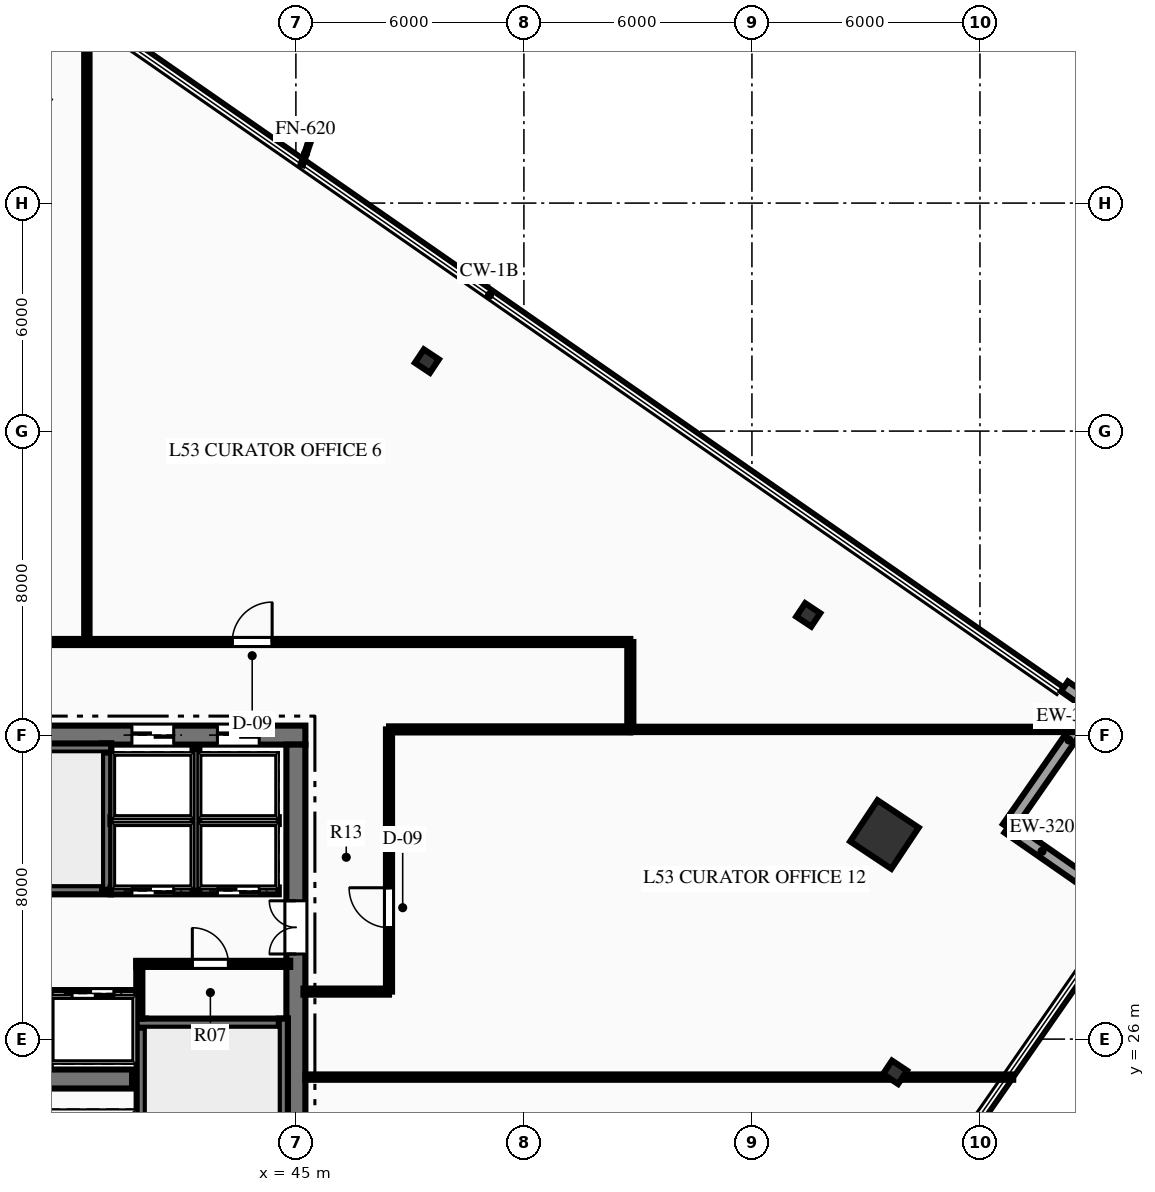
"""IFC4 building model, lengths in metres.
Left out: names, types, materials, properties, quantities, classifications, styles, units other than length and angle.
Written with IfcOpenShell. Run it as: python <this file> out.ifc"""

import sys

from ifc_helpers import new_model, si_unit, direction, frame, frame_2d, origin, origin_2d, place, context, subcontext, project, spatial, rectangle, hollow_rectangle, i_section, extrude, element, fill, save


model = new_model("IFC4")
c1 = context("Model", 3, precision=1e-05, world=origin(), true_north=direction((0.0, 1.0)))
c2 = subcontext(c1, "Body", "Model", "MODEL_VIEW")
j1 = project(units=[si_unit("LENGTHUNIT", "METRE"), si_unit("PLANEANGLEUNIT", "RADIAN")], contexts=[c1])
p1 = place(None, origin())
s1 = spatial("IfcSite", under=j1, at=p1, CompositionType="ELEMENT")
p2 = place(p1, origin())
s2 = spatial("IfcBuilding", under=s1, at=p2, CompositionType="ELEMENT")
p3 = place(p2, frame((0.0, 0.0, 213.45)))
s3 = spatial("IfcBuildingStorey", under=s2, at=p3, CompositionType="ELEMENT", Elevation=213.45)
p4 = place(p3, frame((26.75, 34.0, 0.0), z_axis=(0.0, 0.0, 1.0), x_axis=(1.0, 0.0, 0.0)))
e1 = element("IfcWall", 1, at=p4, inside=s3, PredefinedType="SHEAR", context=c2, shape_type="SweptSolid", body=[
    extrude(rectangle(XDim=18.5, YDim=0.5, at=frame_2d((9.25, 0.0))), origin(), (0.0, 0.0, 1.0), 3.75),
])
p5 = place(p4, frame((13.935, 0.0, 0.0)))
e2 = element("IfcOpeningElement", 2, at=p5, cuts=e1, PredefinedType="OPENING", context=c2, shape_type="SweptSolid", body=[
    extrude(rectangle(XDim=1.1, YDim=2.15, at=frame_2d((0.55, 1.075))), frame((0.0, 0.26, 0.0), z_axis=(0.0, -1.0, 0.0), x_axis=(1.0, 0.0, 0.0)), (0.0, 0.0, 1.0), 0.52),
])
p6 = place(p4, frame((16.185, 0.0, 0.0)))
e3 = element("IfcOpeningElement", 3, at=p6, cuts=e1, PredefinedType="OPENING", context=c2, shape_type="SweptSolid", body=[
    extrude(rectangle(XDim=1.1, YDim=2.15, at=frame_2d((0.55, 1.075))), frame((0.0, 0.26, 0.0), z_axis=(0.0, -1.0, 0.0), x_axis=(1.0, 0.0, 0.0)), (0.0, 0.0, 1.0), 0.52),
])
p7 = place(p3, frame((45.0, 18.25, 0.0), z_axis=(0.0, 0.0, 1.0), x_axis=(0.0, 1.0, 0.0)))
e4 = element("IfcWall", 4, at=p7, inside=s3, PredefinedType="SHEAR", context=c2, shape_type="SweptSolid", body=[
    extrude(rectangle(XDim=15.5, YDim=0.5, at=frame_2d((7.75, 0.0))), origin(), (0.0, 0.0, 1.0), 3.75),
])
p8 = place(p7, frame((9.99, 0.0, 0.0)))
e5 = element("IfcOpeningElement", 5, at=p8, cuts=e4, PredefinedType="OPENING", context=c2, shape_type="SweptSolid", body=[
    extrude(rectangle(XDim=1.4, YDim=2.2, at=frame_2d((0.7, 1.1))), frame((0.0, 0.26, 0.0), z_axis=(0.0, -1.0, 0.0), x_axis=(1.0, 0.0, 0.0)), (0.0, 0.0, 1.0), 0.52),
])
p9 = place(p3, frame((31.31, 24.95, 0.0), z_axis=(0.0, 0.0, 1.0), x_axis=(1.0, 0.0, 0.0)))
e6 = element("IfcWall", 6, at=p9, inside=s3, PredefinedType="SHEAR", context=c2, shape_type="SweptSolid", body=[
    extrude(rectangle(XDim=9.38, YDim=0.5, at=frame_2d((4.69, 0.0))), origin(), (0.0, 0.0, 1.0), 3.75),
])
p10 = place(p3, frame((40.93, 18.28, 0.0), z_axis=(0.0, 0.0, 1.0), x_axis=(0.0, 1.0, 0.0)))
e7 = element("IfcWall", 7, at=p10, inside=s3, PredefinedType="SHEAR", context=c2, shape_type="SweptSolid", body=[
    extrude(rectangle(XDim=8.26, YDim=0.24, at=frame_2d((4.13, 0.0))), origin(), (0.0, 0.0, 1.0), 3.75),
])
p11 = place(p10, frame((0.365, 0.0, 0.0)))
e8 = element("IfcOpeningElement", 8, at=p11, cuts=e7, PredefinedType="OPENING", context=c2, shape_type="SweptSolid", body=[
    extrude(rectangle(XDim=1.05, YDim=2.15, at=frame_2d((0.525, 1.075))), frame((0.0, 0.13, 0.0), z_axis=(0.0, -1.0, 0.0), x_axis=(1.0, 0.0, 0.0)), (0.0, 0.0, 1.0), 0.26),
])
p12 = place(p3, frame((40.81, 26.42, 0.0), z_axis=(0.0, 0.0, 1.0), x_axis=(1.0, 0.0, 0.0)))
e9 = element("IfcWall", 9, at=p12, inside=s3, PredefinedType="SHEAR", context=c2, shape_type="SweptSolid", body=[
    extrude(rectangle(XDim=3.98, YDim=0.24, at=frame_2d((1.99, 0.0))), origin(), (0.0, 0.0, 1.0), 3.75),
])
p13 = place(p3, frame((44.67, 18.28, 0.0), z_axis=(0.0, 0.0, 1.0), x_axis=(0.0, 1.0, 0.0)))
e10 = element("IfcWall", 10, at=p13, inside=s3, PredefinedType="SHEAR", context=c2, shape_type="SweptSolid", body=[
    extrude(rectangle(XDim=8.26, YDim=0.24, at=frame_2d((4.13, 0.0))), origin(), (0.0, 0.0, 1.0), 3.75),
])
p14 = place(p3, frame((31.76, 29.93, 0.0), z_axis=(0.0, 0.0, 1.0), x_axis=(1.0, 0.0, 0.0)))
e11 = element("IfcWall", 11, at=p14, inside=s3, PredefinedType="SHEAR", context=c2, shape_type="SweptSolid", body=[
    extrude(rectangle(XDim=8.38, YDim=0.24, at=frame_2d((4.19, 0.0))), origin(), (0.0, 0.0, 1.0), 3.75),
])
p15 = place(p14, frame((0.565, 0.0, 0.0)))
e12 = element("IfcOpeningElement", 12, at=p15, cuts=e11, PredefinedType="OPENING", context=c2, shape_type="SweptSolid", body=[
    extrude(rectangle(XDim=1.05, YDim=2.15, at=frame_2d((0.525, 1.075))), frame((0.0, 0.13, 0.0), z_axis=(0.0, -1.0, 0.0), x_axis=(1.0, 0.0, 0.0)), (0.0, 0.0, 1.0), 0.26),
])
p16 = place(p3, frame((40.02, 29.93, 0.0), z_axis=(0.0, 0.0, 1.0), x_axis=(0.0, 1.0, 0.0)))
e13 = element("IfcWall", 13, at=p16, inside=s3, PredefinedType="SHEAR", context=c2, shape_type="SweptSolid", body=[
    extrude(rectangle(XDim=3.85, YDim=0.24, at=frame_2d((1.925, 0.0))), origin(), (0.0, 0.0, 1.0), 3.75),
])
p17 = place(p3, frame((37.85, 33.66, 0.0), z_axis=(0.0, 0.0, 1.0), x_axis=(1.0, 0.0, 0.0)))
e14 = element("IfcWall", 14, at=p17, inside=s3, PredefinedType="SHEAR", context=c2, shape_type="SweptSolid", body=[
    extrude(rectangle(XDim=2.29, YDim=0.24, at=frame_2d((1.145, 0.0))), origin(), (0.0, 0.0, 1.0), 3.75),
])
p18 = place(p3, frame((60.486, 31.384, 0.0), z_axis=(0.0, 0.0, 1.0), x_axis=(0.554118199338, 0.832437998389, 0.0)))
e15 = element("IfcColumn", 15, at=p18, inside=s3, PredefinedType="COLUMN", context=c2, shape_type="SweptSolid", body=[
    extrude(hollow_rectangle(XDim=1.3, YDim=1.3, WallThickness=0.06, at=origin_2d()), origin(), (0.0, 0.0, 1.0), 3.75),
])
for number, where, z_axis, x_axis in (
    (16, (60.766, 25.126, 0.0), (0.0, 0.0, 1.0), (0.554, 0.832, 0.0)),
    (17, (58.481, 37.164, 0.0), (0.0, 0.0, 1.0), (0.554, 0.832, 0.0)),
    (18, (48.448, 43.842, 0.0), (0.0, 0.0, 1.0), (0.554, 0.832, 0.0)),
):
    element("IfcColumn", number, at=place(p3, frame(where, z_axis=z_axis, x_axis=x_axis)), inside=s3, PredefinedType="COLUMN", context=c2, shape_type="SweptSolid", body=[
        extrude(i_section(OverallWidth=0.424, OverallDepth=0.474, WebThickness=0.048, FlangeThickness=0.077, at=origin_2d()), origin(), (0.0, 0.0, 1.0), 3.75),
    ])
p19 = place(p3, frame((63.737, 31.565, 0.0), z_axis=(0.0, 0.0, 1.0), x_axis=(0.821156469931, -0.570703120625, 0.0)))
e19 = element("IfcWall", 19, at=p19, inside=s3, PredefinedType="STANDARD", context=c2, shape_type="SweptSolid", body=[
    extrude(rectangle(XDim=3.9, YDim=0.32, at=frame_2d((1.95, 0.0))), origin(), (0.0, 0.0, 1.0), 3.47),
])
p20 = place(p3, frame((65.963, 34.768, 0.0), z_axis=(0.0, 0.0, 1.0), x_axis=(-0.570732457334, -0.821136080163, 0.0)))
e20 = element("IfcWall", 20, at=p20, inside=s3, PredefinedType="STANDARD", context=c2, shape_type="SweptSolid", body=[
    extrude(rectangle(XDim=3.9, YDim=0.32, at=frame_2d((1.95, 0.0))), origin(), (0.0, 0.0, 1.0), 3.47),
])
p21 = place(p3, frame((65.224, 35.281, 0.0), z_axis=(0.0, 0.0, 1.0), x_axis=(0.821126300875, -0.570746526938, 0.0)))
e21 = element("IfcWall", 21, at=p21, inside=s3, PredefinedType="STANDARD", context=c2, shape_type="SweptSolid", body=[
    extrude(rectangle(XDim=0.9, YDim=0.32, at=frame_2d((0.45, 0.0))), origin(), (0.0, 0.0, 1.0), 3.47),
])
p22 = place(p3, frame((40.8, 27.98, 0.0), z_axis=(0.0, 0.0, 1.0), x_axis=(1.0, 0.0, 0.0)))
e22 = element("IfcWall", 22, at=p22, inside=s3, PredefinedType="PARTITIONING", context=c2, shape_type="SweptSolid", body=[
    extrude(rectangle(XDim=4.05, YDim=0.16, at=frame_2d((2.025, 0.0))), origin(), (0.0, 0.0, 1.0), 3.47),
])
p23 = place(p22, frame((1.475, 0.0, 0.0)))
e23 = element("IfcOpeningElement", 23, at=p23, cuts=e22, PredefinedType="OPENING", context=c2, shape_type="SweptSolid", body=[
    extrude(rectangle(XDim=0.95, YDim=2.15, at=frame_2d((0.475, 1.075))), frame((0.0, 0.09, 0.0), z_axis=(0.0, -1.0, 0.0), x_axis=(1.0, 0.0, 0.0)), (0.0, 0.0, 1.0), 0.18),
])
p24 = place(p3, frame((40.88, 26.54, 0.0), z_axis=(0.0, 0.0, 1.0), x_axis=(0.0, 1.0, 0.0)))
e24 = element("IfcWall", 24, at=p24, inside=s3, PredefinedType="PARTITIONING", context=c2, shape_type="SweptSolid", body=[
    extrude(rectangle(XDim=1.51, YDim=0.16, at=frame_2d((0.755, 0.0))), origin(), (0.0, 0.0, 1.0), 3.47),
])
p25 = place(p3, frame((40.12, 29.9, 0.0), z_axis=(0.0, 0.0, 1.0), x_axis=(1.0, 0.0, 0.0)))
e25 = element("IfcWall", 25, at=p25, inside=s3, PredefinedType="PARTITIONING", context=c2, shape_type="SweptSolid", body=[
    extrude(rectangle(XDim=4.43, YDim=0.18, at=frame_2d((2.215, 0.0))), origin(), (0.0, 0.0, 1.0), 3.47),
])
p26 = place(p25, frame((0.565, 0.0, 0.0)))
e26 = element("IfcOpeningElement", 26, at=p26, cuts=e25, PredefinedType="OPENING", context=c2, shape_type="SweptSolid", body=[
    extrude(rectangle(XDim=1.1, YDim=2.15, at=frame_2d((0.55, 1.075))), frame((0.0, 0.1, 0.0), z_axis=(0.0, -1.0, 0.0), x_axis=(1.0, 0.0, 0.0)), (0.0, 0.0, 1.0), 0.2),
])
p27 = place(p25, frame((2.815, 0.0, 0.0)))
e27 = element("IfcOpeningElement", 27, at=p27, cuts=e25, PredefinedType="OPENING", context=c2, shape_type="SweptSolid", body=[
    extrude(rectangle(XDim=1.1, YDim=2.15, at=frame_2d((0.55, 1.075))), frame((0.0, 0.1, 0.0), z_axis=(0.0, -1.0, 0.0), x_axis=(1.0, 0.0, 0.0)), (0.0, 0.0, 1.0), 0.2),
])
p28 = place(p3, frame((40.12, 31.75, 0.0), z_axis=(0.0, 0.0, 1.0), x_axis=(1.0, 0.0, 0.0)))
e28 = element("IfcWall", 28, at=p28, inside=s3, PredefinedType="PARTITIONING", context=c2, shape_type="SweptSolid", body=[
    extrude(rectangle(XDim=4.43, YDim=0.18, at=frame_2d((2.215, 0.0))), origin(), (0.0, 0.0, 1.0), 3.47),
])
p29 = place(p3, frame((42.37, 29.9, 0.0), z_axis=(0.0, 0.0, 1.0), x_axis=(0.0, 1.0, 0.0)))
e29 = element("IfcWall", 29, at=p29, inside=s3, PredefinedType="PARTITIONING", context=c2, shape_type="SweptSolid", body=[
    extrude(rectangle(XDim=3.75, YDim=0.18, at=frame_2d((1.875, 0.0))), origin(), (0.0, 0.0, 1.0), 3.47),
])
p30 = place(p3, frame((31.2, 27.2, 0.0), z_axis=(0.0, 0.0, 1.0), x_axis=(1.0, 0.0, 0.0)))
e30 = element("IfcWall", 30, at=p30, inside=s3, PredefinedType="PARTITIONING", context=c2, shape_type="SweptSolid", body=[
    extrude(rectangle(XDim=9.6, YDim=0.18, at=frame_2d((4.8, 0.0))), origin(), (0.0, 0.0, 1.0), 3.47),
])
p31 = place(p30, frame((0.59, 0.0, 0.0)))
e31 = element("IfcOpeningElement", 31, at=p31, cuts=e30, PredefinedType="OPENING", context=c2, shape_type="SweptSolid", body=[
    extrude(rectangle(XDim=1.1, YDim=2.15, at=frame_2d((0.55, 1.075))), frame((0.0, 0.1, 0.0), z_axis=(0.0, -1.0, 0.0), x_axis=(1.0, 0.0, 0.0)), (0.0, 0.0, 1.0), 0.2),
])
p32 = place(p30, frame((2.99, 0.0, 0.0)))
e32 = element("IfcOpeningElement", 32, at=p32, cuts=e30, PredefinedType="OPENING", context=c2, shape_type="SweptSolid", body=[
    extrude(rectangle(XDim=1.1, YDim=2.15, at=frame_2d((0.55, 1.075))), frame((0.0, 0.1, 0.0), z_axis=(0.0, -1.0, 0.0), x_axis=(1.0, 0.0, 0.0)), (0.0, 0.0, 1.0), 0.2),
])
p33 = place(p30, frame((5.51, 0.0, 0.0)))
e33 = element("IfcOpeningElement", 33, at=p33, cuts=e30, PredefinedType="OPENING", context=c2, shape_type="SweptSolid", body=[
    extrude(rectangle(XDim=1.1, YDim=2.15, at=frame_2d((0.55, 1.075))), frame((0.0, 0.1, 0.0), z_axis=(0.0, -1.0, 0.0), x_axis=(1.0, 0.0, 0.0)), (0.0, 0.0, 1.0), 0.2),
])
p34 = place(p30, frame((7.91, 0.0, 0.0)))
e34 = element("IfcOpeningElement", 34, at=p34, cuts=e30, PredefinedType="OPENING", context=c2, shape_type="SweptSolid", body=[
    extrude(rectangle(XDim=1.1, YDim=2.15, at=frame_2d((0.55, 1.075))), frame((0.0, 0.1, 0.0), z_axis=(0.0, -1.0, 0.0), x_axis=(1.0, 0.0, 0.0)), (0.0, 0.0, 1.0), 0.2),
])
p35 = place(p3, frame((18.2, 36.45, 0.0), z_axis=(0.0, 0.0, 1.0), x_axis=(1.0, 0.0, 0.0)))
e35 = element("IfcWall", 35, at=p35, inside=s3, PredefinedType="PARTITIONING", context=c2, shape_type="SweptSolid", body=[
    extrude(rectangle(XDim=35.6, YDim=0.16, at=frame_2d((17.8, 0.0))), origin(), (0.0, 0.0, 1.0), 2.849),
])
p36 = place(p35, frame((7.55, 0.0, 0.0)))
e36 = element("IfcOpeningElement", 36, at=p36, cuts=e35, PredefinedType="OPENING", context=c2, shape_type="SweptSolid", body=[
    extrude(rectangle(XDim=0.9, YDim=2.15, at=frame_2d((0.45, 1.075))), frame((0.0, 0.09, 0.0), z_axis=(0.0, -1.0, 0.0), x_axis=(1.0, 0.0, 0.0)), (0.0, 0.0, 1.0), 0.18),
])
p37 = place(p35, frame((9.85, 0.0, 0.0)))
e37 = element("IfcOpeningElement", 37, at=p37, cuts=e35, PredefinedType="OPENING", context=c2, shape_type="SweptSolid", body=[
    extrude(rectangle(XDim=0.9, YDim=2.15, at=frame_2d((0.45, 1.075))), frame((0.0, 0.09, 0.0), z_axis=(0.0, -1.0, 0.0), x_axis=(1.0, 0.0, 0.0)), (0.0, 0.0, 1.0), 0.18),
])
p38 = place(p35, frame((12.1, 0.0, 0.0)))
e38 = element("IfcOpeningElement", 38, at=p38, cuts=e35, PredefinedType="OPENING", context=c2, shape_type="SweptSolid", body=[
    extrude(rectangle(XDim=1.0, YDim=2.15, at=frame_2d((0.5, 1.075))), frame((0.0, 0.09, 0.0), z_axis=(0.0, -1.0, 0.0), x_axis=(1.0, 0.0, 0.0)), (0.0, 0.0, 1.0), 0.18),
])
p39 = place(p35, frame((17.01, 0.0, 0.0)))
e39 = element("IfcOpeningElement", 39, at=p39, cuts=e35, PredefinedType="OPENING", context=c2, shape_type="SweptSolid", body=[
    extrude(rectangle(XDim=1.05, YDim=2.15, at=frame_2d((0.525, 1.075))), frame((0.0, 0.09, 0.0), z_axis=(0.0, -1.0, 0.0), x_axis=(1.0, 0.0, 0.0)), (0.0, 0.0, 1.0), 0.18),
])
p40 = place(p35, frame((25.125, 0.0, 0.0)))
e40 = element("IfcOpeningElement", 40, at=p40, cuts=e35, PredefinedType="OPENING", context=c2, shape_type="SweptSolid", body=[
    extrude(rectangle(XDim=1.05, YDim=2.15, at=frame_2d((0.525, 1.075))), frame((0.0, 0.09, 0.0), z_axis=(0.0, -1.0, 0.0), x_axis=(1.0, 0.0, 0.0)), (0.0, 0.0, 1.0), 0.18),
])
p41 = place(p3, frame((47.45, 34.15, 0.0), z_axis=(0.0, 0.0, 1.0), x_axis=(1.0, 0.0, 0.0)))
e41 = element("IfcWall", 41, at=p41, inside=s3, PredefinedType="PARTITIONING", context=c2, shape_type="SweptSolid", body=[
    extrude(rectangle(XDim=6.35, YDim=0.16, at=frame_2d((3.175, 0.0))), origin(), (0.0, 0.0, 1.0), 3.47),
])
p42 = place(p3, frame((47.45, 27.25, 0.0), z_axis=(0.0, 0.0, 1.0), x_axis=(0.0, 1.0, 0.0)))
e42 = element("IfcWall", 42, at=p42, inside=s3, PredefinedType="PARTITIONING", context=c2, shape_type="SweptSolid", body=[
    extrude(rectangle(XDim=6.9, YDim=0.16, at=frame_2d((3.45, 0.0))), origin(), (0.0, 0.0, 1.0), 3.47),
])
p43 = place(p42, frame((1.683, 0.0, 0.0)))
e43 = element("IfcOpeningElement", 43, at=p43, cuts=e42, PredefinedType="OPENING", context=c2, shape_type="SweptSolid", body=[
    extrude(rectangle(XDim=1.05, YDim=2.15, at=frame_2d((0.525, 1.075))), frame((0.0, 0.09, 0.0), z_axis=(0.0, -1.0, 0.0), x_axis=(1.0, 0.0, 0.0)), (0.0, 0.0, 1.0), 0.18),
])
p44 = place(p3, frame((45.2, 27.25, 0.0), z_axis=(0.0, 0.0, 1.0), x_axis=(1.0, 0.0, 0.0)))
e44 = element("IfcWall", 44, at=p44, inside=s3, PredefinedType="PARTITIONING", context=c2, shape_type="SweptSolid", body=[
    extrude(rectangle(XDim=2.25, YDim=0.16, at=frame_2d((1.125, 0.0))), origin(), (0.0, 0.0, 1.0), 3.47),
])
p45 = place(p3, frame((53.8, 34.15, 0.0), z_axis=(0.0, 0.0, 1.0), x_axis=(0.0, 1.0, 0.0)))
e45 = element("IfcWall", 45, at=p45, inside=s3, PredefinedType="PARTITIONING", context=c2, shape_type="SweptSolid", body=[
    extrude(rectangle(XDim=2.3, YDim=0.16, at=frame_2d((1.15, 0.0))), origin(), (0.0, 0.0, 1.0), 3.47),
])
p46 = place(p3, frame((53.8, 34.15, 0.0), z_axis=(0.0, 0.0, 1.0), x_axis=(1.0, 0.0, 0.0)))
e46 = element("IfcWall", 46, at=p46, inside=s3, PredefinedType="PARTITIONING", context=c2, shape_type="SweptSolid", body=[
    extrude(rectangle(XDim=11.685, YDim=0.14, at=frame_2d((5.842, 0.0))), origin(), (0.0, 0.0, 1.0), 3.47),
])
p47 = place(p3, frame((39.5, 36.45, 0.0), z_axis=(0.0, 0.0, 1.0), x_axis=(0.0, 1.0, 0.0)))
e47 = element("IfcWall", 47, at=p47, inside=s3, PredefinedType="PARTITIONING", context=c2, shape_type="SweptSolid", body=[
    extrude(rectangle(XDim=16.661, YDim=0.14, at=frame_2d((8.331, 0.0))), origin(), (0.0, 0.0, 1.0), 3.47),
])
p48 = place(p3, frame((45.25, 25.0, 0.0), z_axis=(0.0, 0.0, 1.0), x_axis=(1.0, 0.0, 0.0)))
e48 = element("IfcWall", 48, at=p48, inside=s3, PredefinedType="PARTITIONING", context=c2, shape_type="SweptSolid", body=[
    extrude(rectangle(XDim=18.625, YDim=0.14, at=frame_2d((9.312, 0.0))), origin(), (0.0, 0.0, 1.0), 2.849),
])
p49 = place(p23, origin())
e49 = element("IfcDoor", 49, at=p49, inside=s3, OperationType="SINGLE_SWING_LEFT", PredefinedType="DOOR", context=c2, shape_type="SweptSolid", body=[
    extrude(rectangle(XDim=0.95, YDim=2.15, at=frame_2d((0.475, 1.075))), frame((0.0, 0.025, 0.0), z_axis=(0.0, -1.0, 0.0), x_axis=(1.0, 0.0, 0.0)), (0.0, 0.0, 1.0), 0.05),
])
fill(e23, e49)
p50 = place(p8, origin())
e50 = element("IfcDoor", 50, at=p50, inside=s3, OperationType="DOUBLE_DOOR_SINGLE_SWING", PredefinedType="DOOR", context=c2, shape_type="SweptSolid", body=[
    extrude(rectangle(XDim=1.4, YDim=2.2, at=frame_2d((0.7, 1.1))), frame((0.0, 0.025, 0.0), z_axis=(0.0, -1.0, 0.0), x_axis=(1.0, 0.0, 0.0)), (0.0, 0.0, 1.0), 0.05),
])
fill(e5, e50)
p51 = place(p40, origin())
e51 = element("IfcDoor", 51, at=p51, inside=s3, OperationType="SINGLE_SWING_RIGHT", PredefinedType="DOOR", context=c2, shape_type="SweptSolid", body=[
    extrude(rectangle(XDim=1.05, YDim=2.15, at=frame_2d((0.525, 1.075))), frame((0.0, 0.025, 0.0), z_axis=(0.0, -1.0, 0.0), x_axis=(1.0, 0.0, 0.0)), (0.0, 0.0, 1.0), 0.05),
])
fill(e40, e51)
p52 = place(p43, origin())
e52 = element("IfcDoor", 52, at=p52, inside=s3, OperationType="SINGLE_SWING_RIGHT", PredefinedType="DOOR", context=c2, shape_type="SweptSolid", body=[
    extrude(rectangle(XDim=1.05, YDim=2.15, at=frame_2d((0.525, 1.075))), frame((0.0, 0.025, 0.0), z_axis=(0.0, -1.0, 0.0), x_axis=(1.0, 0.0, 0.0)), (0.0, 0.0, 1.0), 0.05),
])
fill(e43, e52)
p53 = place(p26, origin())
e53 = element("IfcDoor", 53, at=p53, inside=s3, OperationType="SLIDING_TO_LEFT", PredefinedType="DOOR", context=c2, shape_type="SweptSolid", body=[
    extrude(rectangle(XDim=1.1, YDim=2.15, at=frame_2d((0.55, 1.075))), frame((0.0, 0.025, 0.0), z_axis=(0.0, -1.0, 0.0), x_axis=(1.0, 0.0, 0.0)), (0.0, 0.0, 1.0), 0.05),
])
fill(e26, e53)
p54 = place(p27, origin())
e54 = element("IfcDoor", 54, at=p54, inside=s3, OperationType="SLIDING_TO_LEFT", PredefinedType="DOOR", context=c2, shape_type="SweptSolid", body=[
    extrude(rectangle(XDim=1.1, YDim=2.15, at=frame_2d((0.55, 1.075))), frame((0.0, 0.025, 0.0), z_axis=(0.0, -1.0, 0.0), x_axis=(1.0, 0.0, 0.0)), (0.0, 0.0, 1.0), 0.05),
])
fill(e27, e54)
p55 = place(p5, origin())
e55 = element("IfcDoor", 55, at=p55, inside=s3, OperationType="SLIDING_TO_LEFT", PredefinedType="DOOR", context=c2, shape_type="SweptSolid", body=[
    extrude(rectangle(XDim=1.1, YDim=2.15, at=frame_2d((0.55, 1.075))), frame((0.0, 0.025, 0.0), z_axis=(0.0, -1.0, 0.0), x_axis=(1.0, 0.0, 0.0)), (0.0, 0.0, 1.0), 0.05),
])
fill(e2, e55)
p56 = place(p6, origin())
e56 = element("IfcDoor", 56, at=p56, inside=s3, OperationType="SLIDING_TO_LEFT", PredefinedType="DOOR", context=c2, shape_type="SweptSolid", body=[
    extrude(rectangle(XDim=1.1, YDim=2.15, at=frame_2d((0.55, 1.075))), frame((0.0, 0.025, 0.0), z_axis=(0.0, -1.0, 0.0), x_axis=(1.0, 0.0, 0.0)), (0.0, 0.0, 1.0), 0.05),
])
fill(e3, e56)
p57 = place(p34, origin())
e57 = element("IfcDoor", 57, at=p57, inside=s3, OperationType="SLIDING_TO_LEFT", PredefinedType="DOOR", context=c2, shape_type="SweptSolid", body=[
    extrude(rectangle(XDim=1.1, YDim=2.15, at=frame_2d((0.55, 1.075))), frame((0.0, 0.025, 0.0), z_axis=(0.0, -1.0, 0.0), x_axis=(1.0, 0.0, 0.0)), (0.0, 0.0, 1.0), 0.05),
])
fill(e34, e57)
save(model, sys.argv[1])
